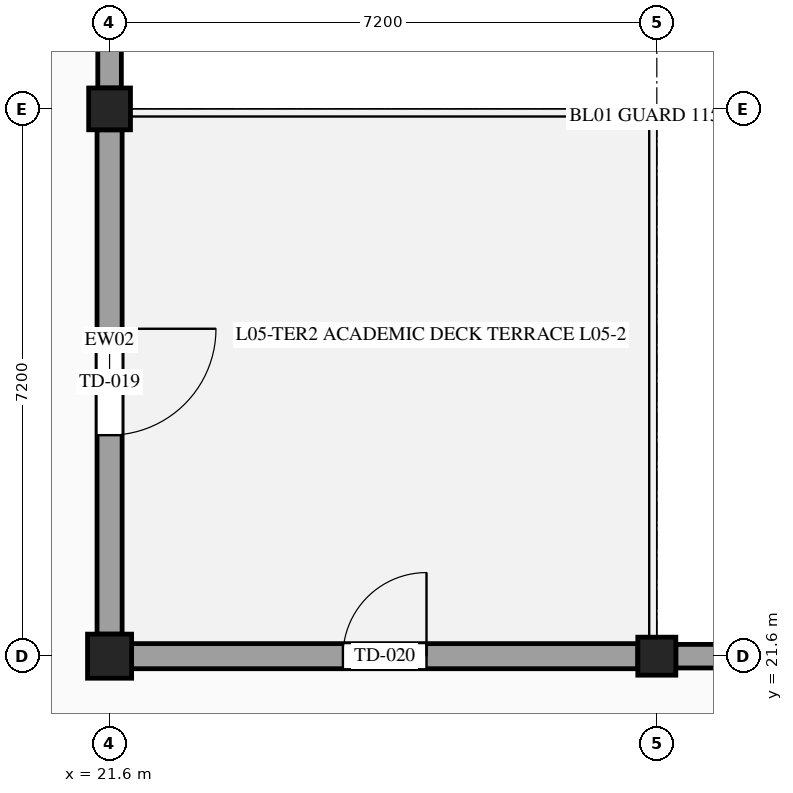
"""IFC4 building model, lengths in metres.
Left out: names, types, materials, properties, quantities, classifications, styles, units other than length and angle.
Written with IfcOpenShell. Run it as: python <this file> out.ifc"""

import sys

from ifc_helpers import new_model, si_unit, direction, frame, frame_2d, origin, origin_2d, place, context, subcontext, project, spatial, rectangle, extrude, element, fill, save


model = new_model("IFC4")
c1 = context("Model", 3, precision=1e-05, world=origin(), true_north=direction((0.0, 1.0)))
c2 = subcontext(c1, "Body", "Model", "MODEL_VIEW")
j1 = project(units=[si_unit("LENGTHUNIT", "METRE"), si_unit("PLANEANGLEUNIT", "RADIAN")], contexts=[c1])
p1 = place(None, origin())
s1 = spatial("IfcSite", under=j1, at=p1, CompositionType="ELEMENT")
p2 = place(p1, origin())
s2 = spatial("IfcBuilding", under=s1, at=p2, CompositionType="ELEMENT")
p3 = place(p2, frame((0.0, 0.0, 22.8)))
s3 = spatial("IfcBuildingStorey", under=s2, at=p3, CompositionType="ELEMENT", Elevation=22.8)
p4 = place(p3, frame((21.6, 21.6, 0.0), z_axis=(0.0, 0.0, 1.0), x_axis=(1.0, 0.0, 0.0)))
e1 = element("IfcColumn", 1, at=p4, inside=s3, PredefinedType="COLUMN", context=c2, shape_type="SweptSolid", body=[
    extrude(rectangle(XDim=0.58, YDim=0.58, at=origin_2d()), origin(), (0.0, 0.0, 1.0), 3.9),
])
p5 = place(p3, frame((21.6, 28.8, 0.0), z_axis=(0.0, 0.0, 1.0), x_axis=(1.0, 0.0, 0.0)))
e2 = element("IfcColumn", 2, at=p5, inside=s3, PredefinedType="COLUMN", context=c2, shape_type="SweptSolid", body=[
    extrude(rectangle(XDim=0.55, YDim=0.55, at=origin_2d()), origin(), (0.0, 0.0, 1.0), 3.9),
])
p6 = place(p3, frame((28.8, 21.6, 0.0), z_axis=(0.0, 0.0, 1.0), x_axis=(1.0, 0.0, 0.0)))
e3 = element("IfcColumn", 3, at=p6, inside=s3, PredefinedType="COLUMN", context=c2, shape_type="SweptSolid", body=[
    extrude(rectangle(XDim=0.5, YDim=0.5, at=origin_2d()), origin(), (0.0, 0.0, 1.0), 3.9),
])
p7 = place(p3, frame((21.6, 35.74, 0.0), z_axis=(0.0, 0.0, 1.0), x_axis=(0.0, -1.0, 0.0)))
e4 = element("IfcWall", 4, at=p7, inside=s3, PredefinedType="STANDARD", context=c2, shape_type="SweptSolid", body=[
    extrude(rectangle(XDim=6.665, YDim=0.31, at=frame_2d((3.333, 0.0))), origin(), (0.0, 0.0, 1.0), 2.865),
])
p8 = place(p7, frame((1.883, 0.0, 0.98)))
e5 = element("IfcOpeningElement", 5, at=p8, cuts=e4, PredefinedType="OPENING", context=c2, shape_type="SweptSolid", body=[
    extrude(rectangle(XDim=2.9, YDim=1.6, at=frame_2d((1.45, 0.8))), frame((0.0, 0.165, 0.0), z_axis=(0.0, -1.0, 0.0), x_axis=(1.0, 0.0, 0.0)), (0.0, 0.0, 1.0), 0.33),
])
p9 = place(p3, frame((21.6, 28.525, 0.0), z_axis=(0.0, 0.0, 1.0), x_axis=(0.0, -1.0, 0.0)))
e6 = element("IfcWall", 6, at=p9, inside=s3, PredefinedType="STANDARD", context=c2, shape_type="SweptSolid", body=[
    extrude(rectangle(XDim=6.635, YDim=0.33, at=frame_2d((3.317, 0.0))), origin(), (0.0, 0.0, 1.0), 2.865),
])
p10 = place(p9, frame((2.617, 0.0, 0.0)))
e7 = element("IfcOpeningElement", 7, at=p10, cuts=e6, PredefinedType="OPENING", context=c2, shape_type="SweptSolid", body=[
    extrude(rectangle(XDim=1.4, YDim=2.25, at=frame_2d((0.7, 1.125))), frame((0.0, 0.175, 0.0), z_axis=(0.0, -1.0, 0.0), x_axis=(1.0, 0.0, 0.0)), (0.0, 0.0, 1.0), 0.35),
])
p11 = place(p3, frame((21.89, 21.6, 0.0), z_axis=(0.0, 0.0, 1.0), x_axis=(1.0, 0.0, 0.0)))
e8 = element("IfcWall", 8, at=p11, inside=s3, PredefinedType="STANDARD", context=c2, shape_type="SweptSolid", body=[
    extrude(rectangle(XDim=6.66, YDim=0.33, at=frame_2d((3.33, 0.0))), origin(), (0.0, 0.0, 1.0), 2.865),
])
p12 = place(p11, frame((2.78, 0.0, 0.0)))
e9 = element("IfcOpeningElement", 9, at=p12, cuts=e8, PredefinedType="OPENING", context=c2, shape_type="SweptSolid", body=[
    extrude(rectangle(XDim=1.1, YDim=2.2, at=frame_2d((0.55, 1.1))), frame((0.0, 0.175, 0.0), z_axis=(0.0, -1.0, 0.0), x_axis=(1.0, 0.0, 0.0)), (0.0, 0.0, 1.0), 0.35),
])
p13 = place(p3, frame((29.05, 21.6, 0.0), z_axis=(0.0, 0.0, 1.0), x_axis=(1.0, 0.0, 0.0)))
e10 = element("IfcWall", 10, at=p13, inside=s3, PredefinedType="STANDARD", context=c2, shape_type="SweptSolid", body=[
    extrude(rectangle(XDim=6.69, YDim=0.31, at=frame_2d((3.345, 0.0))), origin(), (0.0, 0.0, 1.0), 2.865),
])
p14 = place(p13, frame((0.945, 0.0, 0.98)))
e11 = element("IfcOpeningElement", 11, at=p14, cuts=e10, PredefinedType="OPENING", context=c2, shape_type="SweptSolid", body=[
    extrude(rectangle(XDim=4.8, YDim=1.5, at=frame_2d((2.4, 0.75))), frame((0.0, 0.165, 0.0), z_axis=(0.0, -1.0, 0.0), x_axis=(1.0, 0.0, 0.0)), (0.0, 0.0, 1.0), 0.33),
])
p15 = place(p10, origin())
e12 = element("IfcDoor", 12, at=p15, inside=s3, OperationType="SINGLE_SWING_LEFT", PredefinedType="DOOR", context=c2, shape_type="SweptSolid", body=[
    extrude(rectangle(XDim=1.4, YDim=2.25, at=frame_2d((0.7, 1.125))), frame((0.0, 0.025, 0.0), z_axis=(0.0, -1.0, 0.0), x_axis=(1.0, 0.0, 0.0)), (0.0, 0.0, 1.0), 0.05),
])
fill(e7, e12)
p16 = place(p12, origin())
e13 = element("IfcDoor", 13, at=p16, inside=s3, OperationType="SINGLE_SWING_RIGHT", PredefinedType="DOOR", context=c2, shape_type="SweptSolid", body=[
    extrude(rectangle(XDim=1.1, YDim=2.2, at=frame_2d((0.55, 1.1))), frame((0.0, 0.025, 0.0), z_axis=(0.0, -1.0, 0.0), x_axis=(1.0, 0.0, 0.0)), (0.0, 0.0, 1.0), 0.05),
])
fill(e9, e13)
save(model, sys.argv[1])
